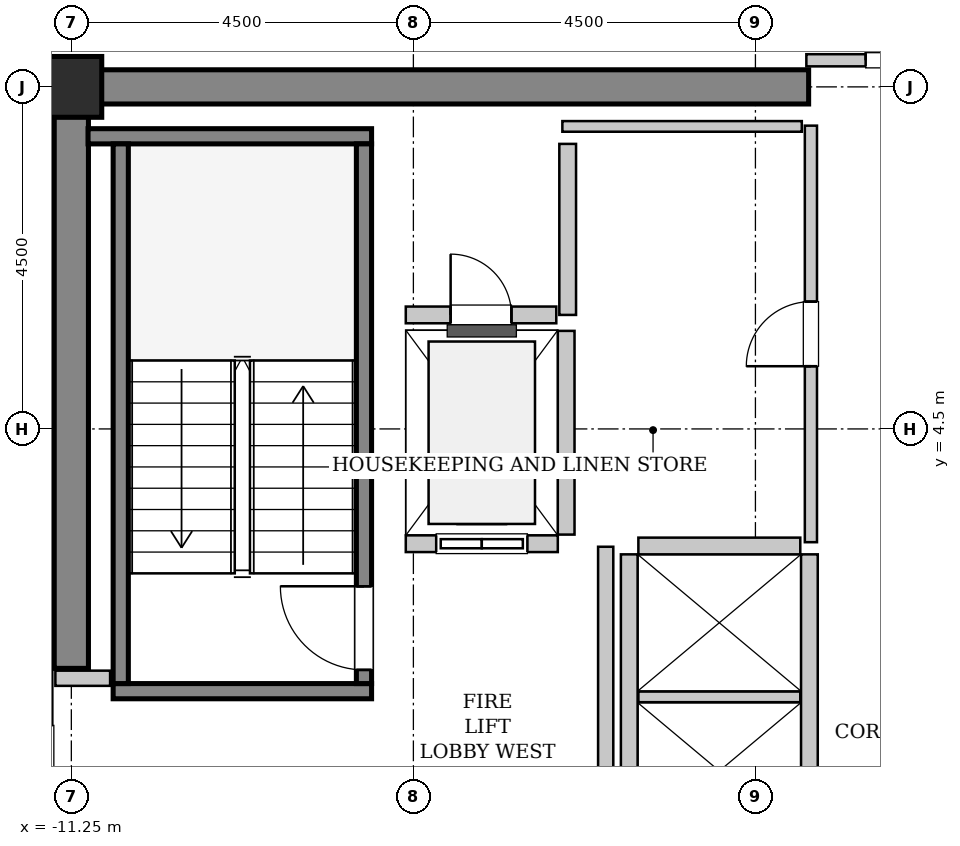
"""IFC4 building model, lengths in metres.
Left out: names, types, materials, properties, quantities, classifications, styles, units other than length and angle.
Written with IfcOpenShell. Run it as: python <this file> out.ifc"""

import sys

from ifc_helpers import new_model, si_unit, direction, frame, frame_2d, origin, origin_2d, place, context, subcontext, project, spatial, rectangle, hollow_rectangle, extrude, source, transform, mapped, element, fill, save


model = new_model("IFC4")
c1 = context("Model", 3, precision=1e-05, world=origin(), true_north=direction((0.0, 1.0)))
c2 = subcontext(c1, "Body", "Model", "MODEL_VIEW")
j1 = project(units=[si_unit("LENGTHUNIT", "METRE"), si_unit("PLANEANGLEUNIT", "RADIAN")], contexts=[c1])
p1 = place(None, origin())
s1 = spatial("IfcSite", under=j1, at=p1, CompositionType="ELEMENT")
p2 = place(p1, origin())
s2 = spatial("IfcBuilding", under=s1, at=p2, CompositionType="ELEMENT")
p3 = place(p2, frame((0.0, 0.0, 256.0)))
s3 = spatial("IfcBuildingStorey", under=s2, at=p3, CompositionType="ELEMENT", Elevation=256.0)
m1 = source(origin(), c2, "Body", "SweptSolid", [
    extrude(rectangle(XDim=9.925, YDim=0.45, at=frame_2d((4.962, 0.0))), origin(), (0.0, 0.0, 1.0), 3.8),
])
p4 = place(p3, frame((-11.475, 9.0, 0.0), z_axis=(0.0, 0.0, 1.0), x_axis=(1.0, 0.0, 0.0)))
e1 = element("IfcWall", 1, at=p4, inside=s3, PredefinedType="SHEAR", context=c2, shape_type="MappedRepresentation", body=[
    mapped(m1, transform((0.0, 0.0, 0.0), x_axis=(1.0, 0.0, 0.0), y_axis=(0.0, 1.0, 0.0), z_axis=(0.0, 0.0, 1.0), scale=1.0)),
])
m2 = source(origin(), c2, "Body", "SweptSolid", [
    extrude(rectangle(XDim=7.425, YDim=0.45, at=frame_2d((3.712, 0.0))), origin(), (0.0, 0.0, 1.0), 3.8),
])
p5 = place(p3, frame((-11.25, 1.35, 0.0), z_axis=(0.0, 0.0, 1.0), x_axis=(0.0, 1.0, 0.0)))
e2 = element("IfcWall", 2, at=p5, inside=s3, PredefinedType="SHEAR", context=c2, shape_type="MappedRepresentation", body=[
    mapped(m2, transform((0.0, 0.0, 0.0), x_axis=(1.0, 0.0, 0.0), y_axis=(0.0, 1.0, 0.0), z_axis=(0.0, 0.0, 1.0), scale=1.0)),
])
m3 = source(origin(), c2, "Body", "SweptSolid", [
    extrude(hollow_rectangle(XDim=0.8, YDim=0.8, WallThickness=0.04, InnerFilletRadius=0.04, OuterFilletRadius=0.08, at=origin_2d()), origin(), (0.0, 0.0, 1.0), 3.8),
])
p6 = place(p3, frame((-11.25, 9.0, 0.0), z_axis=(0.0, 0.0, 1.0), x_axis=(1.0, 0.0, 0.0)))
e3 = element("IfcColumn", 3, at=p6, inside=s3, PredefinedType="COLUMN", context=c2, shape_type="MappedRepresentation", body=[
    mapped(m3, transform((0.0, 0.0, 0.0), x_axis=(1.0, 0.0, 0.0), y_axis=(0.0, 1.0, 0.0), z_axis=(0.0, 0.0, 1.0), scale=1.0)),
])
m4 = source(origin(), c2, "Body", "SweptSolid", [
    extrude(rectangle(XDim=3.4, YDim=0.2, at=frame_2d((1.7, 0.0))), origin(), (0.0, 0.0, 1.0), 3.8),
])
p7 = place(p3, frame((-7.3, 1.05, 0.0), z_axis=(0.0, 0.0, 1.0), x_axis=(-1.0, 0.0, 0.0)))
e4 = element("IfcWall", 4, at=p7, inside=s3, PredefinedType="SOLIDWALL", context=c2, shape_type="MappedRepresentation", body=[
    mapped(m4, transform((0.0, 0.0, 0.0), x_axis=(1.0, 0.0, 0.0), y_axis=(0.0, 1.0, 0.0), z_axis=(0.0, 0.0, 1.0), scale=1.0)),
])
m5 = source(origin(), c2, "Body", "SweptSolid", [
    extrude(rectangle(XDim=3.73, YDim=0.2, at=frame_2d((1.865, 0.0))), origin(), (0.0, 0.0, 1.0), 3.8),
])
p8 = place(p3, frame((-7.3, 8.35, 0.0), z_axis=(0.0, 0.0, 1.0), x_axis=(-1.0, 0.0, 0.0)))
e5 = element("IfcWall", 5, at=p8, inside=s3, PredefinedType="SOLIDWALL", context=c2, shape_type="MappedRepresentation", body=[
    mapped(m5, transform((0.0, 0.0, 0.0), x_axis=(1.0, 0.0, 0.0), y_axis=(0.0, 1.0, 0.0), z_axis=(0.0, 0.0, 1.0), scale=1.0)),
])
m6 = source(origin(), c2, "Body", "SweptSolid", [
    extrude(rectangle(XDim=7.1, YDim=0.2, at=frame_2d((3.55, 0.0))), origin(), (0.0, 0.0, 1.0), 3.8),
])
p9 = place(p3, frame((-7.4, 1.15, 0.0), z_axis=(0.0, 0.0, 1.0), x_axis=(0.0, 1.0, 0.0)))
e6 = element("IfcWall", 6, at=p9, inside=s3, PredefinedType="SOLIDWALL", context=c2, shape_type="MappedRepresentation", body=[
    mapped(m6, transform((0.0, 0.0, 0.0), x_axis=(1.0, 0.0, 0.0), y_axis=(0.0, 1.0, 0.0), z_axis=(0.0, 0.0, 1.0), scale=1.0)),
])
p10 = place(p9, frame((0.18, 0.0, 0.0)))
e7 = element("IfcOpeningElement", 7, at=p10, cuts=e6, PredefinedType="OPENING", context=c2, shape_type="SweptSolid", body=[
    extrude(rectangle(XDim=1.1, YDim=2.15, at=frame_2d((0.55, 1.075))), frame((0.0, 0.11, 0.0), z_axis=(0.0, -1.0, 0.0), x_axis=(1.0, 0.0, 0.0)), (0.0, 0.0, 1.0), 0.22),
])
p11 = place(p3, frame((-10.6, 1.15, 0.0), z_axis=(0.0, 0.0, 1.0), x_axis=(0.0, 1.0, 0.0)))
e8 = element("IfcWall", 8, at=p11, inside=s3, PredefinedType="SOLIDWALL", context=c2, shape_type="MappedRepresentation", body=[
    mapped(m6, transform((0.0, 0.0, 0.0), x_axis=(1.0, 0.0, 0.0), y_axis=(0.0, 1.0, 0.0), z_axis=(0.0, 0.0, 1.0), scale=1.0)),
])
m7 = source(origin(), c2, "Body", "SweptSolid", [
    extrude(rectangle(XDim=2.0, YDim=0.22, at=frame_2d((1.0, 0.0))), origin(), (0.0, 0.0, 1.0), 3.485),
])
p12 = place(p3, frame((-6.85, 2.99, 0.0), z_axis=(0.0, 0.0, 1.0), x_axis=(1.0, 0.0, 0.0)))
e9 = element("IfcWall", 9, at=p12, inside=s3, PredefinedType="SOLIDWALL", context=c2, shape_type="MappedRepresentation", body=[
    mapped(m7, transform((0.0, 0.0, 0.0), x_axis=(1.0, 0.0, 0.0), y_axis=(0.0, 1.0, 0.0), z_axis=(0.0, 0.0, 1.0), scale=1.0)),
])
p13 = place(p12, frame((0.4, 0.0, 0.0)))
e10 = element("IfcOpeningElement", 10, at=p13, cuts=e9, PredefinedType="OPENING", context=c2, shape_type="SweptSolid", body=[
    extrude(rectangle(XDim=1.2, YDim=2.2, at=frame_2d((0.6, 1.1))), frame((0.0, 0.12, 0.0), z_axis=(0.0, -1.0, 0.0), x_axis=(1.0, 0.0, 0.0)), (0.0, 0.0, 1.0), 0.24),
])
m8 = source(origin(), c2, "Body", "SweptSolid", [
    extrude(rectangle(XDim=2.68, YDim=0.22, at=frame_2d((1.34, 0.0))), origin(), (0.0, 0.0, 1.0), 3.485),
])
p14 = place(p3, frame((-4.74, 3.11, 0.0), z_axis=(0.0, 0.0, 1.0), x_axis=(0.0, 1.0, 0.0)))
e11 = element("IfcWall", 11, at=p14, inside=s3, PredefinedType="SOLIDWALL", context=c2, shape_type="MappedRepresentation", body=[
    mapped(m8, transform((0.0, 0.0, 0.0), x_axis=(1.0, 0.0, 0.0), y_axis=(0.0, 1.0, 0.0), z_axis=(0.0, 0.0, 1.0), scale=1.0)),
])
m9 = source(origin(), c2, "Body", "SweptSolid", [
    extrude(rectangle(XDim=5.7, YDim=0.22, at=frame_2d((2.85, 0.0))), origin(), (0.0, 0.0, 1.0), 3.485),
])
for number, where, z_axis, x_axis in (
    (12, (-1.54, -2.85, 0.0), (0.0, 0.0, 1.0), (0.0, 1.0, 0.0)),
    (13, (-3.91, 2.85, 0.0), (0.0, 0.0, 1.0), (0.0, -1.0, 0.0)),
):
    element("IfcWall", number, at=place(p3, frame(where, z_axis=z_axis, x_axis=x_axis)), inside=s3, PredefinedType="SOLIDWALL", context=c2, shape_type="MappedRepresentation", body=[
        mapped(m9, transform((0.0, 0.0, 0.0), x_axis=(1.0, 0.0, 0.0), y_axis=(0.0, 1.0, 0.0), z_axis=(0.0, 0.0, 1.0), scale=1.0)),
    ])
m10 = source(origin(), c2, "Body", "SweptSolid", [
    extrude(rectangle(XDim=2.13, YDim=0.14, at=frame_2d((1.065, 0.0))), origin(), (0.0, 0.0, 1.0), 3.485),
])
p15 = place(p3, frame((-3.79, 0.975, 0.0), z_axis=(0.0, 0.0, 1.0), x_axis=(1.0, 0.0, 0.0)))
e14 = element("IfcWall", 14, at=p15, inside=s3, PredefinedType="PARTITIONING", context=c2, shape_type="MappedRepresentation", body=[
    mapped(m10, transform((0.0, 0.0, 0.0), x_axis=(1.0, 0.0, 0.0), y_axis=(0.0, 1.0, 0.0), z_axis=(0.0, 0.0, 1.0), scale=1.0)),
])
m11 = source(origin(), c2, "Body", "SweptSolid", [
    extrude(rectangle(XDim=2.13, YDim=0.22, at=frame_2d((1.065, 0.0))), origin(), (0.0, 0.0, 1.0), 3.485),
])
p16 = place(p3, frame((-1.66, 2.96, 0.0), z_axis=(0.0, 0.0, 1.0), x_axis=(-1.0, 0.0, 0.0)))
e15 = element("IfcWall", 15, at=p16, inside=s3, PredefinedType="SOLIDWALL", context=c2, shape_type="MappedRepresentation", body=[
    mapped(m11, transform((0.0, 0.0, 0.0), x_axis=(1.0, 0.0, 0.0), y_axis=(0.0, 1.0, 0.0), z_axis=(0.0, 0.0, 1.0), scale=1.0)),
])
m12 = source(origin(), c2, "Body", "SweptSolid", [
    extrude(rectangle(XDim=2.25, YDim=0.22, at=frame_2d((1.125, 0.0))), origin(), (0.0, 0.0, 1.0), 3.485),
])
p17 = place(p3, frame((-4.72, 6.0, 0.0), z_axis=(0.0, 0.0, 1.0), x_axis=(0.0, 1.0, 0.0)))
e16 = element("IfcWall", 16, at=p17, inside=s3, PredefinedType="SOLIDWALL", context=c2, shape_type="MappedRepresentation", body=[
    mapped(m12, transform((0.0, 0.0, 0.0), x_axis=(1.0, 0.0, 0.0), y_axis=(0.0, 1.0, 0.0), z_axis=(0.0, 0.0, 1.0), scale=1.0)),
])
m13 = source(origin(), c2, "Body", "SweptSolid", [
    extrude(rectangle(XDim=1.98, YDim=0.22, at=frame_2d((0.99, 0.0))), origin(), (0.0, 0.0, 1.0), 3.485),
])
p18 = place(p3, frame((-6.85, 6.0, 0.0), z_axis=(0.0, 0.0, 1.0), x_axis=(1.0, 0.0, 0.0)))
e17 = element("IfcWall", 17, at=p18, inside=s3, PredefinedType="SOLIDWALL", context=c2, shape_type="MappedRepresentation", body=[
    mapped(m13, transform((0.0, 0.0, 0.0), x_axis=(1.0, 0.0, 0.0), y_axis=(0.0, 1.0, 0.0), z_axis=(0.0, 0.0, 1.0), scale=1.0)),
])
p19 = place(p18, frame((0.59, 0.0, 0.0)))
e18 = element("IfcOpeningElement", 18, at=p19, cuts=e17, PredefinedType="OPENING", context=c2, shape_type="SweptSolid", body=[
    extrude(rectangle(XDim=0.8, YDim=2.0, at=frame_2d((0.4, 1.0))), frame((0.0, 0.12, 0.0), z_axis=(0.0, -1.0, 0.0), x_axis=(1.0, 0.0, 0.0)), (0.0, 0.0, 1.0), 0.24),
])
m14 = source(origin(), c2, "Body", "SweptSolid", [
    extrude(rectangle(XDim=5.9, YDim=0.2, at=frame_2d((2.95, 0.0))), origin(), (0.0, 0.0, 1.0), 3.485),
])
p20 = place(p3, frame((-4.22, -2.95, 0.0), z_axis=(0.0, 0.0, 1.0), x_axis=(0.0, 1.0, 0.0)))
e19 = element("IfcWall", 19, at=p20, inside=s3, PredefinedType="PARTITIONING", context=c2, shape_type="MappedRepresentation", body=[
    mapped(m14, transform((0.0, 0.0, 0.0), x_axis=(1.0, 0.0, 0.0), y_axis=(0.0, 1.0, 0.0), z_axis=(0.0, 0.0, 1.0), scale=1.0)),
])
m15 = source(origin(), c2, "Body", "SweptSolid", [
    extrude(rectangle(XDim=0.72, YDim=0.2, at=frame_2d((0.36, 0.0))), origin(), (0.0, 0.0, 1.0), 3.485),
])
p21 = place(p3, frame((-11.46, 1.22, 0.0), z_axis=(0.0, 0.0, 1.0), x_axis=(1.0, 0.0, 0.0)))
e20 = element("IfcWall", 20, at=p21, inside=s3, PredefinedType="PARTITIONING", context=c2, shape_type="MappedRepresentation", body=[
    mapped(m15, transform((0.0, 0.0, 0.0), x_axis=(1.0, 0.0, 0.0), y_axis=(0.0, 1.0, 0.0), z_axis=(0.0, 0.0, 1.0), scale=1.0)),
])
m16 = source(origin(), c2, "Body", "SweptSolid", [
    extrude(rectangle(XDim=3.16, YDim=0.16, at=frame_2d((1.58, 0.0))), origin(), (0.0, 0.0, 1.0), 2.575),
])
p22 = place(p3, frame((-1.58, 9.35, 0.0), z_axis=(0.0, 0.0, 1.0), x_axis=(1.0, 0.0, 0.0)))
e21 = element("IfcWall", 21, at=p22, inside=s3, PredefinedType="PARTITIONING", context=c2, shape_type="MappedRepresentation", body=[
    mapped(m16, transform((0.0, 0.0, 0.0), x_axis=(1.0, 0.0, 0.0), y_axis=(0.0, 1.0, 0.0), z_axis=(0.0, 0.0, 1.0), scale=1.0)),
])
p23 = place(p22, frame((0.78, 0.0, 0.0)))
e22 = element("IfcOpeningElement", 22, at=p23, cuts=e21, PredefinedType="OPENING", context=c2, shape_type="SweptSolid", body=[
    extrude(rectangle(XDim=1.6, YDim=2.3, at=frame_2d((0.8, 1.15))), frame((0.0, 0.09, 0.0), z_axis=(0.0, -1.0, 0.0), x_axis=(1.0, 0.0, 0.0)), (0.0, 0.0, 1.0), 0.18),
])
m17 = source(origin(), c2, "Body", "SweptSolid", [
    extrude(rectangle(XDim=5.48, YDim=0.16, at=frame_2d((2.74, 0.0))), origin(), (0.0, 0.0, 1.0), 3.485),
])
p24 = place(p3, frame((-1.52, 3.01, 0.0), z_axis=(0.0, 0.0, 1.0), x_axis=(0.0, 1.0, 0.0)))
e23 = element("IfcWall", 23, at=p24, inside=s3, PredefinedType="PARTITIONING", context=c2, shape_type="MappedRepresentation", body=[
    mapped(m17, transform((0.0, 0.0, 0.0), x_axis=(1.0, 0.0, 0.0), y_axis=(0.0, 1.0, 0.0), z_axis=(0.0, 0.0, 1.0), scale=1.0)),
])
p25 = place(p24, frame((2.315, 0.0, 0.0)))
e24 = element("IfcOpeningElement", 24, at=p25, cuts=e23, PredefinedType="OPENING", context=c2, shape_type="SweptSolid", body=[
    extrude(rectangle(XDim=0.85, YDim=2.1, at=frame_2d((0.425, 1.05))), frame((0.0, 0.09, 0.0), z_axis=(0.0, -1.0, 0.0), x_axis=(1.0, 0.0, 0.0)), (0.0, 0.0, 1.0), 0.18),
])
m18 = source(origin(), c2, "Body", "SweptSolid", [
    extrude(rectangle(XDim=3.15, YDim=0.14, at=frame_2d((1.575, 0.0))), origin(), (0.0, 0.0, 1.0), 3.485),
])
p26 = place(p3, frame((-4.79, 8.48, 0.0), z_axis=(0.0, 0.0, 1.0), x_axis=(1.0, 0.0, 0.0)))
e25 = element("IfcWall", 25, at=p26, inside=s3, PredefinedType="PARTITIONING", context=c2, shape_type="MappedRepresentation", body=[
    mapped(m18, transform((0.0, 0.0, 0.0), x_axis=(1.0, 0.0, 0.0), y_axis=(0.0, 1.0, 0.0), z_axis=(0.0, 0.0, 1.0), scale=1.0)),
])
m19 = source(origin(), c2, "Body", "SweptSolid", [
    extrude(rectangle(XDim=1.1, YDim=2.15, at=frame_2d((0.55, 1.075))), frame((0.0, 0.025, 0.0), z_axis=(0.0, -1.0, 0.0), x_axis=(1.0, 0.0, 0.0)), (0.0, 0.0, 1.0), 0.05),
])
p27 = place(p10, origin())
e26 = element("IfcDoor", 26, at=p27, inside=s3, OperationType="SINGLE_SWING_RIGHT", PredefinedType="DOOR", context=c2, shape_type="MappedRepresentation", body=[
    mapped(m19, transform((0.0, 0.0, 0.0), x_axis=(1.0, 0.0, 0.0), y_axis=(0.0, 1.0, 0.0), z_axis=(0.0, 0.0, 1.0), scale=1.0)),
])
fill(e7, e26)
m20 = source(origin(), c2, "Body", "SweptSolid", [
    extrude(rectangle(XDim=1.2, YDim=2.2, at=frame_2d((0.6, 1.1))), frame((0.0, 0.025, 0.0), z_axis=(0.0, -1.0, 0.0), x_axis=(1.0, 0.0, 0.0)), (0.0, 0.0, 1.0), 0.05),
])
p28 = place(p13, origin())
e27 = element("IfcDoor", 27, at=p28, inside=s3, OperationType="SLIDING_TO_LEFT", PredefinedType="DOOR", context=c2, shape_type="MappedRepresentation", body=[
    mapped(m20, transform((0.0, 0.0, 0.0), x_axis=(1.0, 0.0, 0.0), y_axis=(0.0, 1.0, 0.0), z_axis=(0.0, 0.0, 1.0), scale=1.0)),
])
fill(e10, e27)
m21 = source(origin(), c2, "Body", "SweptSolid", [
    extrude(rectangle(XDim=0.8, YDim=2.0, at=frame_2d((0.4, 1.0))), frame((0.0, 0.025, 0.0), z_axis=(0.0, -1.0, 0.0), x_axis=(1.0, 0.0, 0.0)), (0.0, 0.0, 1.0), 0.05),
])
p29 = place(p19, origin())
e28 = element("IfcDoor", 28, at=p29, inside=s3, OperationType="SINGLE_SWING_LEFT", PredefinedType="TRAPDOOR", context=c2, shape_type="MappedRepresentation", body=[
    mapped(m21, transform((0.0, 0.0, 0.0), x_axis=(1.0, 0.0, 0.0), y_axis=(0.0, 1.0, 0.0), z_axis=(0.0, 0.0, 1.0), scale=1.0)),
])
fill(e18, e28)
m22 = source(origin(), c2, "Body", "SweptSolid", [
    extrude(rectangle(XDim=1.6, YDim=2.3, at=frame_2d((0.8, 1.15))), frame((0.0, 0.025, 0.0), z_axis=(0.0, -1.0, 0.0), x_axis=(1.0, 0.0, 0.0)), (0.0, 0.0, 1.0), 0.05),
])
p30 = place(p23, origin())
e29 = element("IfcDoor", 29, at=p30, inside=s3, OperationType="DOUBLE_DOOR_SINGLE_SWING", PredefinedType="DOOR", context=c2, shape_type="MappedRepresentation", body=[
    mapped(m22, transform((0.0, 0.0, 0.0), x_axis=(1.0, 0.0, 0.0), y_axis=(0.0, 1.0, 0.0), z_axis=(0.0, 0.0, 1.0), scale=1.0)),
])
fill(e22, e29)
m23 = source(origin(), c2, "Body", "SweptSolid", [
    extrude(rectangle(XDim=0.85, YDim=2.1, at=frame_2d((0.425, 1.05))), frame((0.0, 0.025, 0.0), z_axis=(0.0, -1.0, 0.0), x_axis=(1.0, 0.0, 0.0)), (0.0, 0.0, 1.0), 0.05),
])
p31 = place(p25, origin())
e30 = element("IfcDoor", 30, at=p31, inside=s3, OperationType="SINGLE_SWING_LEFT", PredefinedType="DOOR", context=c2, shape_type="MappedRepresentation", body=[
    mapped(m23, transform((0.0, 0.0, 0.0), x_axis=(1.0, 0.0, 0.0), y_axis=(0.0, 1.0, 0.0), z_axis=(0.0, 0.0, 1.0), scale=1.0)),
])
fill(e24, e30)
save(model, sys.argv[1])
